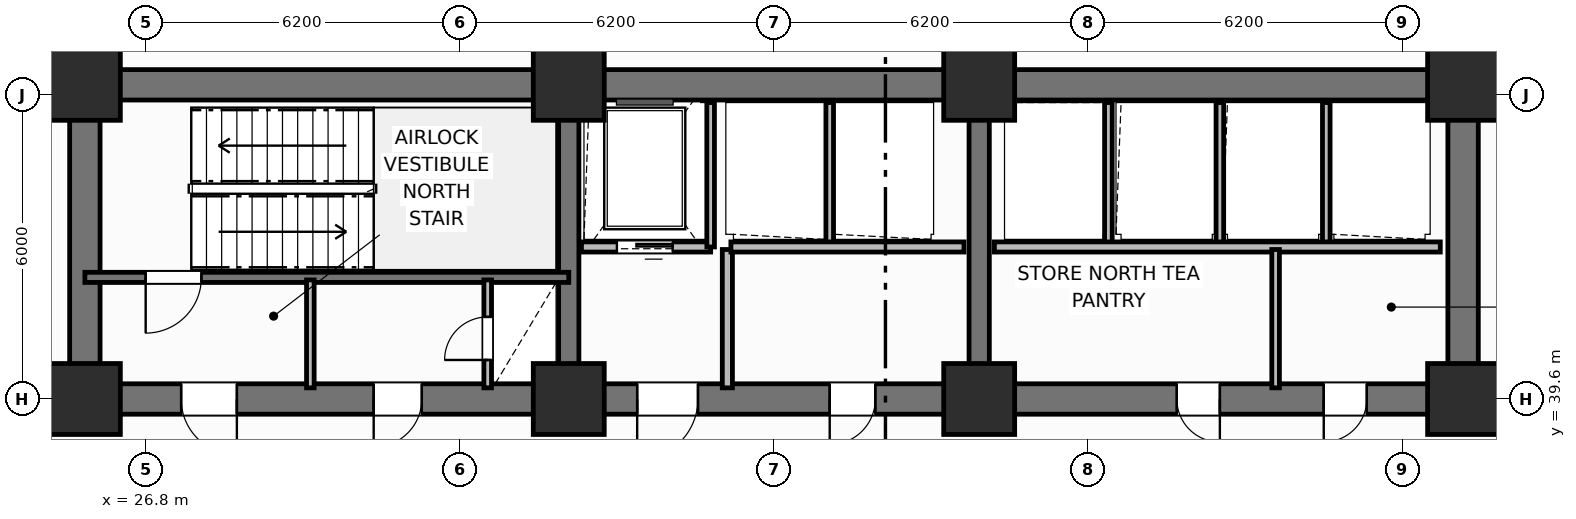
"""IFC4 building model, lengths in metres.
Left out: names, types, materials, properties, quantities, classifications, styles, units other than length and angle.
Written with IfcOpenShell. Run it as: python <this file> out.ifc"""

import sys

from ifc_helpers import new_model, si_unit, direction, frame, frame_2d, origin, origin_2d, place, context, subcontext, project, spatial, rectangle, extrude, element, fill, save


model = new_model("IFC4")
c1 = context("Model", 3, precision=1e-05, world=origin(), true_north=direction((0.0, 1.0)))
c2 = subcontext(c1, "Body", "Model", "MODEL_VIEW")
j1 = project(units=[si_unit("LENGTHUNIT", "METRE"), si_unit("PLANEANGLEUNIT", "RADIAN")], contexts=[c1])
p1 = place(None, origin())
s1 = spatial("IfcSite", under=j1, at=p1, CompositionType="ELEMENT")
p2 = place(p1, origin())
s2 = spatial("IfcBuilding", under=s1, at=p2, CompositionType="ELEMENT")
p3 = place(p2, frame((0.0, 0.0, 6.6)))
s3 = spatial("IfcBuildingStorey", under=s2, at=p3, CompositionType="ELEMENT", Elevation=6.6)
p4 = place(p3, frame((25.6, 45.8, 0.0), z_axis=(0.0, 0.0, 1.0), x_axis=(1.0, 0.0, 0.0)))
e1 = element("IfcWall", 1, at=p4, inside=s3, PredefinedType="SHEAR", context=c2, shape_type="SweptSolid", body=[
    extrude(rectangle(XDim=27.2, YDim=0.6, at=frame_2d((13.6, 0.0))), origin(), (0.0, 0.0, 1.0), 4.5),
])
for number, where, z_axis, x_axis in (
    (2, (25.6, 39.9, 0.0), (0.0, 0.0, 1.0), (0.0, 1.0, 0.0)),
    (3, (52.8, 39.9, 0.0), (0.0, 0.0, 1.0), (0.0, 1.0, 0.0)),
):
    element("IfcWall", number, at=place(p3, frame(where, z_axis=z_axis, x_axis=x_axis)), inside=s3, PredefinedType="SHEAR", context=c2, shape_type="SweptSolid", body=[
        extrude(rectangle(XDim=5.6, YDim=0.6, at=frame_2d((2.8, 0.0))), origin(), (0.0, 0.0, 1.0), 4.5),
    ])
p5 = place(p3, frame((52.8, 39.6, 0.0), z_axis=(0.0, 0.0, 1.0), x_axis=(-1.0, 0.0, 0.0)))
e4 = element("IfcWall", 4, at=p5, inside=s3, PredefinedType="SHEAR", context=c2, shape_type="SweptSolid", body=[
    extrude(rectangle(XDim=27.2, YDim=0.6, at=frame_2d((13.6, 0.0))), origin(), (0.0, 0.0, 1.0), 4.5),
])
p6 = place(p5, frame((24.2, 0.0, 0.0)))
e5 = element("IfcOpeningElement", 5, at=p6, cuts=e4, PredefinedType="OPENING", context=c2, shape_type="SweptSolid", body=[
    extrude(rectangle(XDim=1.1, YDim=2.15, at=frame_2d((0.55, 1.075))), frame((0.0, 0.31, 0.0), z_axis=(0.0, -1.0, 0.0), x_axis=(1.0, 0.0, 0.0)), (0.0, 0.0, 1.0), 0.62),
])
p7 = place(p5, frame((20.55, 0.0, 0.0)))
e6 = element("IfcOpeningElement", 6, at=p7, cuts=e4, PredefinedType="OPENING", context=c2, shape_type="SweptSolid", body=[
    extrude(rectangle(XDim=0.95, YDim=2.1, at=frame_2d((0.475, 1.05))), frame((0.0, 0.31, 0.0), z_axis=(0.0, -1.0, 0.0), x_axis=(1.0, 0.0, 0.0)), (0.0, 0.0, 1.0), 0.62),
])
p8 = place(p5, frame((15.1, 0.0, 0.0)))
e7 = element("IfcOpeningElement", 7, at=p8, cuts=e4, PredefinedType="OPENING", context=c2, shape_type="SweptSolid", body=[
    extrude(rectangle(XDim=1.2, YDim=2.15, at=frame_2d((0.6, 1.075))), frame((0.0, 0.31, 0.0), z_axis=(0.0, -1.0, 0.0), x_axis=(1.0, 0.0, 0.0)), (0.0, 0.0, 1.0), 0.62),
])
p9 = place(p5, frame((11.6, 0.0, 0.0)))
e8 = element("IfcOpeningElement", 8, at=p9, cuts=e4, PredefinedType="OPENING", context=c2, shape_type="SweptSolid", body=[
    extrude(rectangle(XDim=0.9, YDim=2.1, at=frame_2d((0.45, 1.05))), frame((0.0, 0.31, 0.0), z_axis=(0.0, -1.0, 0.0), x_axis=(1.0, 0.0, 0.0)), (0.0, 0.0, 1.0), 0.62),
])
p10 = place(p5, frame((4.8, 0.0, 0.0)))
e9 = element("IfcOpeningElement", 9, at=p10, cuts=e4, PredefinedType="OPENING", context=c2, shape_type="SweptSolid", body=[
    extrude(rectangle(XDim=0.85, YDim=2.1, at=frame_2d((0.425, 1.05))), frame((0.0, 0.31, 0.0), z_axis=(0.0, -1.0, 0.0), x_axis=(1.0, 0.0, 0.0)), (0.0, 0.0, 1.0), 0.62),
])
p11 = place(p5, frame((1.9, 0.0, 0.0)))
e10 = element("IfcOpeningElement", 10, at=p11, cuts=e4, PredefinedType="OPENING", context=c2, shape_type="SweptSolid", body=[
    extrude(rectangle(XDim=0.85, YDim=2.1, at=frame_2d((0.425, 1.05))), frame((0.0, 0.31, 0.0), z_axis=(0.0, -1.0, 0.0), x_axis=(1.0, 0.0, 0.0)), (0.0, 0.0, 1.0), 0.62),
])
for number, where, z_axis, x_axis in (
    (11, (35.15, 39.9, 0.0), (0.0, 0.0, 1.0), (0.0, 1.0, 0.0)),
    (12, (43.25, 39.9, 0.0), (0.0, 0.0, 1.0), (0.0, 1.0, 0.0)),
):
    element("IfcWall", number, at=place(p3, frame(where, z_axis=z_axis, x_axis=x_axis)), inside=s3, PredefinedType="SHEAR", context=c2, shape_type="SweptSolid", body=[
        extrude(rectangle(XDim=5.6, YDim=0.4, at=frame_2d((2.8, 0.0))), origin(), (0.0, 0.0, 1.0), 4.5),
    ])
for number, where, z_axis, x_axis in (
    (13, (25.6, 39.6, 0.0), (0.0, 0.0, 1.0), (1.0, 0.0, 0.0)),
    (14, (25.6, 45.8, 0.0), (0.0, 0.0, 1.0), (1.0, 0.0, 0.0)),
    (15, (35.15, 39.6, 0.0), (0.0, 0.0, 1.0), (1.0, 0.0, 0.0)),
    (16, (35.15, 45.8, 0.0), (0.0, 0.0, 1.0), (1.0, 0.0, 0.0)),
    (17, (43.25, 39.6, 0.0), (0.0, 0.0, 1.0), (1.0, 0.0, 0.0)),
    (18, (43.25, 45.8, 0.0), (0.0, 0.0, 1.0), (1.0, 0.0, 0.0)),
    (19, (52.8, 39.6, 0.0), (0.0, 0.0, 1.0), (1.0, 0.0, 0.0)),
    (20, (52.8, 45.8, 0.0), (0.0, 0.0, 1.0), (1.0, 0.0, 0.0)),
):
    element("IfcColumn", number, at=place(p3, frame(where, z_axis=z_axis, x_axis=x_axis)), inside=s3, PredefinedType="COLUMN", context=c2, shape_type="SweptSolid", body=[
        extrude(rectangle(XDim=1.4, YDim=1.4, at=origin_2d()), origin(), (0.0, 0.0, 1.0), 4.5),
    ])
p12 = place(p3, frame((35.15, 42.0, 0.0), z_axis=(0.0, 0.0, 1.0), x_axis=(-1.0, 0.0, 0.0)))
e21 = element("IfcWall", 21, at=p12, inside=s3, PredefinedType="SHEAR", context=c2, shape_type="SweptSolid", body=[
    extrude(rectangle(XDim=9.55, YDim=0.2, at=frame_2d((4.775, 0.0))), origin(), (0.0, 0.0, 1.0), 4.5),
])
p13 = place(p12, frame((7.25, 0.0, 0.0)))
e22 = element("IfcOpeningElement", 22, at=p13, cuts=e21, PredefinedType="OPENING", context=c2, shape_type="SweptSolid", body=[
    extrude(rectangle(XDim=1.1, YDim=2.15, at=frame_2d((0.55, 1.075))), frame((0.0, 0.11, 0.0), z_axis=(0.0, -1.0, 0.0), x_axis=(1.0, 0.0, 0.0)), (0.0, 0.0, 1.0), 0.22),
])
p14 = place(p3, frame((33.55, 39.82, 0.0), z_axis=(0.0, 0.0, 1.0), x_axis=(0.0, 1.0, 0.0)))
e23 = element("IfcWall", 23, at=p14, inside=s3, PredefinedType="PARTITIONING", context=c2, shape_type="SweptSolid", body=[
    extrude(rectangle(XDim=2.13, YDim=0.15, at=frame_2d((1.065, 0.0))), origin(), (0.0, 0.0, 1.0), 3.42),
])
p15 = place(p14, frame((0.55, 0.0, 0.0)))
e24 = element("IfcOpeningElement", 24, at=p15, cuts=e23, PredefinedType="OPENING", context=c2, shape_type="SweptSolid", body=[
    extrude(rectangle(XDim=0.85, YDim=2.05, at=frame_2d((0.425, 1.025))), frame((0.0, 0.085, 0.0), z_axis=(0.0, -1.0, 0.0), x_axis=(1.0, 0.0, 0.0)), (0.0, 0.0, 1.0), 0.17),
])
p16 = place(p3, frame((30.05, 39.82, 0.0), z_axis=(0.0, 0.0, 1.0), x_axis=(0.0, 1.0, 0.0)))
e25 = element("IfcWall", 25, at=p16, inside=s3, PredefinedType="PARTITIONING", context=c2, shape_type="SweptSolid", body=[
    extrude(rectangle(XDim=2.13, YDim=0.15, at=frame_2d((1.065, 0.0))), origin(), (0.0, 0.0, 1.0), 3.42),
])
p17 = place(p3, frame((37.95, 42.6, 0.0), z_axis=(0.0, 0.0, 1.0), x_axis=(-1.0, 0.0, 0.0)))
e26 = element("IfcWall", 26, at=p17, inside=s3, PredefinedType="PARTITIONING", context=c2, shape_type="SweptSolid", body=[
    extrude(rectangle(XDim=2.55, YDim=0.2, at=frame_2d((1.275, 0.0))), origin(), (0.0, 0.0, 1.0), 3.08),
])
p18 = place(p17, frame((0.75, 0.0, 0.0)))
e27 = element("IfcOpeningElement", 27, at=p18, cuts=e26, PredefinedType="OPENING", context=c2, shape_type="SweptSolid", body=[
    extrude(rectangle(XDim=1.1, YDim=2.15, at=frame_2d((0.55, 1.075))), frame((0.0, 0.11, 0.0), z_axis=(0.0, -1.0, 0.0), x_axis=(1.0, 0.0, 0.0)), (0.0, 0.0, 1.0), 0.22),
])
p19 = place(p3, frame((37.95, 42.6, 0.0), z_axis=(0.0, 0.0, 1.0), x_axis=(0.0, 1.0, 0.0)))
e28 = element("IfcWall", 28, at=p19, inside=s3, PredefinedType="PARTITIONING", context=c2, shape_type="SweptSolid", body=[
    extrude(rectangle(XDim=2.85, YDim=0.15, at=frame_2d((1.425, 0.0))), origin(), (0.0, 0.0, 1.0), 3.42),
])
p20 = place(p3, frame((38.28, 39.82, 0.0), z_axis=(0.0, 0.0, 1.0), x_axis=(0.0, 1.0, 0.0)))
e29 = element("IfcWall", 29, at=p20, inside=s3, PredefinedType="PARTITIONING", context=c2, shape_type="SweptSolid", body=[
    extrude(rectangle(XDim=2.73, YDim=0.2, at=frame_2d((1.365, 0.0))), origin(), (0.0, 0.0, 1.0), 3.42),
])
p21 = place(p3, frame((40.3, 42.65, 0.0), z_axis=(0.0, 0.0, 1.0), x_axis=(0.0, 1.0, 0.0)))
e30 = element("IfcWall", 30, at=p21, inside=s3, PredefinedType="PARTITIONING", context=c2, shape_type="SweptSolid", body=[
    extrude(rectangle(XDim=2.8, YDim=0.15, at=frame_2d((1.4, 0.0))), origin(), (0.0, 0.0, 1.0), 3.42),
])
p22 = place(p3, frame((42.95, 42.6, 0.0), z_axis=(0.0, 0.0, 1.0), x_axis=(-1.0, 0.0, 0.0)))
e31 = element("IfcWall", 31, at=p22, inside=s3, PredefinedType="PARTITIONING", context=c2, shape_type="SweptSolid", body=[
    extrude(rectangle(XDim=4.6, YDim=0.2, at=frame_2d((2.3, 0.0))), origin(), (0.0, 0.0, 1.0), 3.08),
])
for number, where, z_axis, x_axis in (
    (32, (45.8, 42.65, 0.0), (0.0, 0.0, 1.0), (0.0, 1.0, 0.0)),
    (33, (48.0, 42.65, 0.0), (0.0, 0.0, 1.0), (0.0, 1.0, 0.0)),
    (34, (50.1, 42.65, 0.0), (0.0, 0.0, 1.0), (0.0, 1.0, 0.0)),
):
    element("IfcWall", number, at=place(p3, frame(where, z_axis=z_axis, x_axis=x_axis)), inside=s3, PredefinedType="PARTITIONING", context=c2, shape_type="SweptSolid", body=[
        extrude(rectangle(XDim=2.8, YDim=0.15, at=frame_2d((1.4, 0.0))), origin(), (0.0, 0.0, 1.0), 3.42),
    ])
p23 = place(p3, frame((52.35, 42.6, 0.0), z_axis=(0.0, 0.0, 1.0), x_axis=(-1.0, 0.0, 0.0)))
e35 = element("IfcWall", 35, at=p23, inside=s3, PredefinedType="PARTITIONING", context=c2, shape_type="SweptSolid", body=[
    extrude(rectangle(XDim=8.8, YDim=0.2, at=frame_2d((4.4, 0.0))), origin(), (0.0, 0.0, 1.0), 3.42),
])
p24 = place(p3, frame((49.1, 39.82, 0.0), z_axis=(0.0, 0.0, 1.0), x_axis=(0.0, 1.0, 0.0)))
e36 = element("IfcWall", 36, at=p24, inside=s3, PredefinedType="PARTITIONING", context=c2, shape_type="SweptSolid", body=[
    extrude(rectangle(XDim=2.73, YDim=0.15, at=frame_2d((1.365, 0.0))), origin(), (0.0, 0.0, 1.0), 3.42),
])
p25 = place(p3, frame((25.25, 39.55, 0.0), z_axis=(0.0, 0.0, 1.0), x_axis=(-1.0, 0.0, 0.0)))
e37 = element("IfcWall", 37, at=p25, inside=s3, PredefinedType="PARTITIONING", context=c2, shape_type="SweptSolid", body=[
    extrude(rectangle(XDim=13.25, YDim=0.15, at=frame_2d((6.625, 0.0))), origin(), (0.0, 0.0, 1.0), 3.42),
])
p26 = place(p25, frame((4.2, 0.0, 0.0)))
e38 = element("IfcOpeningElement", 38, at=p26, cuts=e37, PredefinedType="OPENING", context=c2, shape_type="SweptSolid", body=[
    extrude(rectangle(XDim=1.0, YDim=2.15, at=frame_2d((0.5, 1.075))), frame((0.0, 0.085, 0.0), z_axis=(0.0, -1.0, 0.0), x_axis=(1.0, 0.0, 0.0)), (0.0, 0.0, 1.0), 0.17),
])
p27 = place(p3, frame((66.4, 39.55, 0.0), z_axis=(0.0, 0.0, 1.0), x_axis=(-1.0, 0.0, 0.0)))
e39 = element("IfcWall", 39, at=p27, inside=s3, PredefinedType="PARTITIONING", context=c2, shape_type="SweptSolid", body=[
    extrude(rectangle(XDim=13.25, YDim=0.15, at=frame_2d((6.625, 0.0))), origin(), (0.0, 0.0, 1.0), 3.42),
])
p28 = place(p27, frame((5.5, 0.0, 0.0)))
e40 = element("IfcOpeningElement", 40, at=p28, cuts=e39, PredefinedType="OPENING", context=c2, shape_type="SweptSolid", body=[
    extrude(rectangle(XDim=1.0, YDim=2.15, at=frame_2d((0.5, 1.075))), frame((0.0, 0.085, 0.0), z_axis=(0.0, -1.0, 0.0), x_axis=(1.0, 0.0, 0.0)), (0.0, 0.0, 1.0), 0.17),
])
p29 = place(p13, origin())
e41 = element("IfcDoor", 41, at=p29, inside=s3, OperationType="SINGLE_SWING_RIGHT", PredefinedType="DOOR", context=c2, shape_type="SweptSolid", body=[
    extrude(rectangle(XDim=1.1, YDim=2.15, at=frame_2d((0.55, 1.075))), frame((0.0, 0.025, 0.0), z_axis=(0.0, -1.0, 0.0), x_axis=(1.0, 0.0, 0.0)), (0.0, 0.0, 1.0), 0.05),
])
fill(e22, e41)
p30 = place(p15, origin())
e42 = element("IfcDoor", 42, at=p30, inside=s3, OperationType="SINGLE_SWING_LEFT", PredefinedType="TRAPDOOR", context=c2, shape_type="SweptSolid", body=[
    extrude(rectangle(XDim=0.85, YDim=2.05, at=frame_2d((0.425, 1.025))), frame((0.0, 0.025, 0.0), z_axis=(0.0, -1.0, 0.0), x_axis=(1.0, 0.0, 0.0)), (0.0, 0.0, 1.0), 0.05),
])
fill(e24, e42)
p31 = place(p18, origin())
e43 = element("IfcDoor", 43, at=p31, inside=s3, OperationType="SLIDING_TO_LEFT", PredefinedType="DOOR", context=c2, shape_type="SweptSolid", body=[
    extrude(rectangle(XDim=1.1, YDim=2.15, at=frame_2d((0.55, 1.075))), frame((0.0, 0.025, 0.0), z_axis=(0.0, -1.0, 0.0), x_axis=(1.0, 0.0, 0.0)), (0.0, 0.0, 1.0), 0.05),
])
fill(e27, e43)
p32 = place(p6, origin())
e44 = element("IfcDoor", 44, at=p32, inside=s3, OperationType="SINGLE_SWING_LEFT", PredefinedType="DOOR", context=c2, shape_type="SweptSolid", body=[
    extrude(rectangle(XDim=1.1, YDim=2.15, at=frame_2d((0.55, 1.075))), frame((0.0, 0.025, 0.0), z_axis=(0.0, -1.0, 0.0), x_axis=(1.0, 0.0, 0.0)), (0.0, 0.0, 1.0), 0.05),
])
fill(e5, e44)
p33 = place(p7, origin())
e45 = element("IfcDoor", 45, at=p33, inside=s3, OperationType="SINGLE_SWING_RIGHT", PredefinedType="DOOR", context=c2, shape_type="SweptSolid", body=[
    extrude(rectangle(XDim=0.95, YDim=2.1, at=frame_2d((0.475, 1.05))), frame((0.0, 0.025, 0.0), z_axis=(0.0, -1.0, 0.0), x_axis=(1.0, 0.0, 0.0)), (0.0, 0.0, 1.0), 0.05),
])
fill(e6, e45)
p34 = place(p8, origin())
e46 = element("IfcDoor", 46, at=p34, inside=s3, OperationType="SINGLE_SWING_RIGHT", PredefinedType="DOOR", context=c2, shape_type="SweptSolid", body=[
    extrude(rectangle(XDim=1.2, YDim=2.15, at=frame_2d((0.6, 1.075))), frame((0.0, 0.025, 0.0), z_axis=(0.0, -1.0, 0.0), x_axis=(1.0, 0.0, 0.0)), (0.0, 0.0, 1.0), 0.05),
])
fill(e7, e46)
p35 = place(p9, origin())
e47 = element("IfcDoor", 47, at=p35, inside=s3, OperationType="SINGLE_SWING_RIGHT", PredefinedType="DOOR", context=c2, shape_type="SweptSolid", body=[
    extrude(rectangle(XDim=0.9, YDim=2.1, at=frame_2d((0.45, 1.05))), frame((0.0, 0.025, 0.0), z_axis=(0.0, -1.0, 0.0), x_axis=(1.0, 0.0, 0.0)), (0.0, 0.0, 1.0), 0.05),
])
fill(e8, e47)
p36 = place(p10, origin())
e48 = element("IfcDoor", 48, at=p36, inside=s3, OperationType="SINGLE_SWING_LEFT", PredefinedType="DOOR", context=c2, shape_type="SweptSolid", body=[
    extrude(rectangle(XDim=0.85, YDim=2.1, at=frame_2d((0.425, 1.05))), frame((0.0, 0.025, 0.0), z_axis=(0.0, -1.0, 0.0), x_axis=(1.0, 0.0, 0.0)), (0.0, 0.0, 1.0), 0.05),
])
fill(e9, e48)
p37 = place(p11, origin())
e49 = element("IfcDoor", 49, at=p37, inside=s3, OperationType="SINGLE_SWING_RIGHT", PredefinedType="DOOR", context=c2, shape_type="SweptSolid", body=[
    extrude(rectangle(XDim=0.85, YDim=2.1, at=frame_2d((0.425, 1.05))), frame((0.0, 0.025, 0.0), z_axis=(0.0, -1.0, 0.0), x_axis=(1.0, 0.0, 0.0)), (0.0, 0.0, 1.0), 0.05),
])
fill(e10, e49)
save(model, sys.argv[1])
